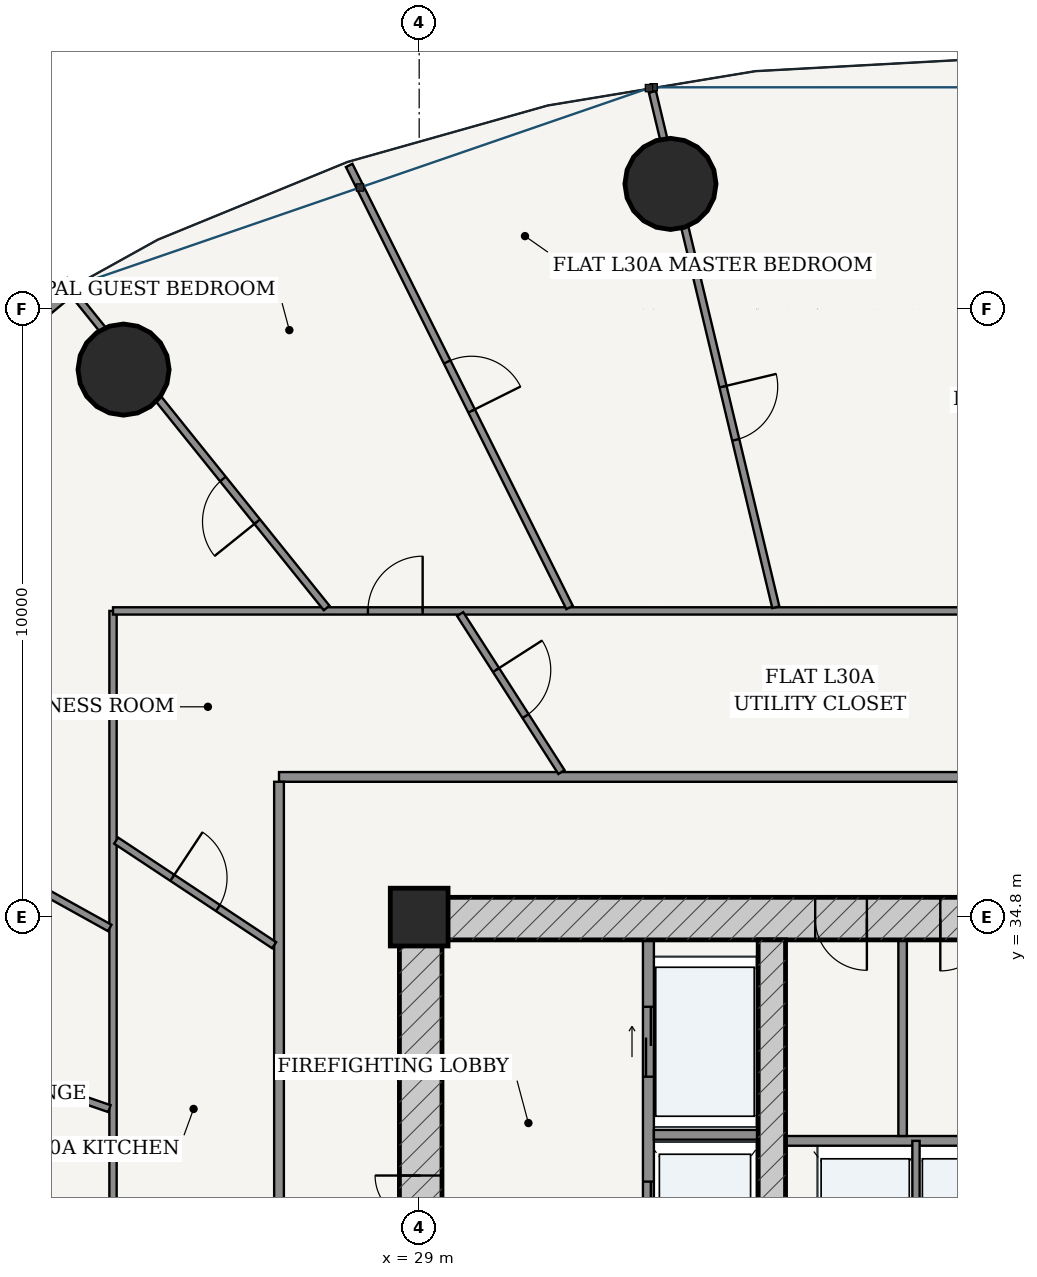
"""IFC4 building model, lengths in metres.
Left out: names, types, materials, properties, quantities, classifications, styles, units other than length and angle.
Written with IfcOpenShell. Run it as: python <this file> out.ifc"""

import sys

from ifc_helpers import new_model, si_unit, direction, frame, frame_2d, origin, origin_2d, place, context, subcontext, project, spatial, rectangle, hollow_circle, extrude, source, transform, mapped, element, fill, save


model = new_model("IFC4")
c1 = context("Model", 3, precision=1e-05, world=origin(), true_north=direction((-0.2419218956, 0.970295726276)))
c2 = subcontext(c1, "Body", "Model", "MODEL_VIEW")
j1 = project(units=[si_unit("LENGTHUNIT", "METRE"), si_unit("PLANEANGLEUNIT", "RADIAN")], contexts=[c1])
p1 = place(None, origin())
s1 = spatial("IfcSite", under=j1, at=p1, CompositionType="ELEMENT")
p2 = place(p1, origin())
s2 = spatial("IfcBuilding", under=s1, at=p2, CompositionType="ELEMENT")
p3 = place(p2, frame((0.0, 0.0, 115.8)))
s3 = spatial("IfcBuildingStorey", under=s2, at=p3, CompositionType="ELEMENT", Elevation=115.8)
p4 = place(p3, frame((29.0, 34.8, 0.0), z_axis=(0.0, 0.0, 1.0), x_axis=(1.0, 0.0, 0.0)))
e1 = element("IfcColumn", 1, at=p4, inside=s3, PredefinedType="COLUMN", context=c2, shape_type="SweptSolid", body=[
    extrude(rectangle(XDim=0.95, YDim=0.95, at=origin_2d()), origin(), (0.0, 0.0, 1.0), 3.6),
])
p5 = place(p3, frame((28.675, 34.775, 0.0), z_axis=(0.0, 0.0, 1.0), x_axis=(1.0, 0.0, 0.0)))
e2 = element("IfcWall", 2, at=p5, inside=s3, PredefinedType="SHEAR", context=c2, shape_type="SweptSolid", body=[
    extrude(rectangle(XDim=18.65, YDim=0.7, at=frame_2d((9.325, 0.0))), origin(), (0.0, 0.0, 1.0), 3.325),
])
p6 = place(p5, frame((6.837, 0.0, 0.0)))
e3 = element("IfcOpeningElement", 3, at=p6, cuts=e2, PredefinedType="OPENING", context=c2, shape_type="SweptSolid", body=[
    extrude(rectangle(XDim=0.85, YDim=2.1, at=frame_2d((0.425, 1.05))), frame((0.0, 0.36, 0.0), z_axis=(0.0, -1.0, 0.0), x_axis=(1.0, 0.0, 0.0)), (0.0, 0.0, 1.0), 0.72),
])
p7 = place(p5, frame((8.895, 0.0, 0.0)))
e4 = element("IfcOpeningElement", 4, at=p7, cuts=e2, PredefinedType="OPENING", context=c2, shape_type="SweptSolid", body=[
    extrude(rectangle(XDim=0.86, YDim=2.1, at=frame_2d((0.43, 1.05))), frame((0.0, 0.36, 0.0), z_axis=(0.0, -1.0, 0.0), x_axis=(1.0, 0.0, 0.0)), (0.0, 0.0, 1.0), 0.72),
])
p8 = place(p5, frame((10.962, 0.0, 0.0)))
e5 = element("IfcOpeningElement", 5, at=p8, cuts=e2, PredefinedType="OPENING", context=c2, shape_type="SweptSolid", body=[
    extrude(rectangle(XDim=0.85, YDim=2.1, at=frame_2d((0.425, 1.05))), frame((0.0, 0.36, 0.0), z_axis=(0.0, -1.0, 0.0), x_axis=(1.0, 0.0, 0.0)), (0.0, 0.0, 1.0), 0.72),
])
p9 = place(p3, frame((29.025, 19.175, 0.0), z_axis=(0.0, 0.0, 1.0), x_axis=(0.0, 1.0, 0.0)))
e6 = element("IfcWall", 6, at=p9, inside=s3, PredefinedType="SHEAR", context=c2, shape_type="SweptSolid", body=[
    extrude(rectangle(XDim=15.25, YDim=0.7, at=frame_2d((7.625, 0.0))), origin(), (0.0, 0.0, 1.0), 3.325),
])
p10 = place(p9, frame((9.875, 0.0, 0.0)))
e7 = element("IfcOpeningElement", 7, at=p10, cuts=e6, PredefinedType="OPENING", context=c2, shape_type="SweptSolid", body=[
    extrude(rectangle(XDim=1.5, YDim=2.2, at=frame_2d((0.75, 1.1))), frame((0.0, 0.36, 0.0), z_axis=(0.0, -1.0, 0.0), x_axis=(1.0, 0.0, 0.0)), (0.0, 0.0, 1.0), 0.72),
])
p11 = place(p3, frame((34.8, 19.175, 0.0), z_axis=(0.0, 0.0, 1.0), x_axis=(0.0, 1.0, 0.0)))
e8 = element("IfcWall", 8, at=p11, inside=s3, PredefinedType="SHEAR", context=c2, shape_type="SweptSolid", body=[
    extrude(rectangle(XDim=15.25, YDim=0.45, at=frame_2d((7.625, 0.0))), origin(), (0.0, 0.0, 1.0), 3.325),
])
p12 = place(p11, frame((7.8, 0.0, 0.0)))
e9 = element("IfcOpeningElement", 9, at=p12, cuts=e8, PredefinedType="OPENING", context=c2, shape_type="SweptSolid", body=[
    extrude(rectangle(XDim=1.05, YDim=2.15, at=frame_2d((0.525, 1.075))), frame((0.0, 0.235, 0.0), z_axis=(0.0, -1.0, 0.0), x_axis=(1.0, 0.0, 0.0)), (0.0, 0.0, 1.0), 0.47),
])
for number, where, z_axis, x_axis in (
    (10, (33.133, 46.857, 0.0), (0.0, 0.0, 1.0), (1.0, 0.0, 0.0)),
    (11, (24.138, 43.803, 0.0), (0.0, 0.0, 1.0), (1.0, 0.0, 0.0)),
):
    element("IfcColumn", number, at=place(p3, frame(where, z_axis=z_axis, x_axis=x_axis)), inside=s3, PredefinedType="COLUMN", context=c2, shape_type="SweptSolid", body=[
        extrude(hollow_circle(Radius=0.75, WallThickness=0.045, at=origin_2d()), origin(), (0.0, 0.0, 1.0), 3.6),
    ])
p13 = place(p3, frame((23.3, 45.202, 0.0), z_axis=(0.0, 0.0, 1.0), x_axis=(-0.769242574941, -0.638956853706, 0.0)))
e12 = element("IfcWall", 12, at=p13, inside=s3, PredefinedType="SOLIDWALL", context=c2, shape_type="SweptSolid", body=[
    extrude(rectangle(XDim=9.69, YDim=0.28, at=frame_2d((4.845, 0.0))), origin(), (0.0, 0.0, 1.0), 3.325),
])
p14 = place(p13, frame((1.566, 0.0, 0.85)))
e13 = element("IfcOpeningElement", 13, at=p14, cuts=e12, PredefinedType="OPENING", context=c2, shape_type="SweptSolid", body=[
    extrude(rectangle(XDim=2.1, YDim=1.95, at=frame_2d((1.05, 0.975))), frame((0.0, 0.15, 0.0), z_axis=(0.0, -1.0, 0.0), x_axis=(1.0, 0.0, 0.0)), (0.0, 0.0, 1.0), 0.3),
])
p15 = place(p13, frame((6.023, 0.0, 0.85)))
e14 = element("IfcOpeningElement", 14, at=p15, cuts=e12, PredefinedType="OPENING", context=c2, shape_type="SweptSolid", body=[
    extrude(rectangle(XDim=2.1, YDim=1.95, at=frame_2d((1.05, 0.975))), frame((0.0, 0.15, 0.0), z_axis=(0.0, -1.0, 0.0), x_axis=(1.0, 0.0, 0.0)), (0.0, 0.0, 1.0), 0.3),
])
p16 = place(p3, frame((32.77, 28.52, 0.0), z_axis=(0.0, 0.0, 1.0), x_axis=(0.0, 1.0, 0.0)))
e15 = element("IfcWall", 15, at=p16, inside=s3, PredefinedType="PARTITIONING", context=c2, shape_type="SweptSolid", body=[
    extrude(rectangle(XDim=5.905, YDim=0.18, at=frame_2d((2.953, 0.0))), origin(), (0.0, 0.0, 1.0), 3.325),
])
p17 = place(p16, frame((3.655, 0.0, 0.0)))
e16 = element("IfcOpeningElement", 16, at=p17, cuts=e15, PredefinedType="OPENING", context=c2, shape_type="SweptSolid", body=[
    extrude(rectangle(XDim=1.15, YDim=2.2, at=frame_2d((0.575, 1.1))), frame((0.0, 0.1, 0.0), z_axis=(0.0, -1.0, 0.0), x_axis=(1.0, 0.0, 0.0)), (0.0, 0.0, 1.0), 0.2),
])
p18 = place(p16, frame((0.73, 0.0, 0.0)))
e17 = element("IfcOpeningElement", 17, at=p18, cuts=e15, PredefinedType="OPENING", context=c2, shape_type="SweptSolid", body=[
    extrude(rectangle(XDim=1.2, YDim=2.25, at=frame_2d((0.6, 1.125))), frame((0.0, 0.1, 0.0), z_axis=(0.0, -1.0, 0.0), x_axis=(1.0, 0.0, 0.0)), (0.0, 0.0, 1.0), 0.2),
])
p19 = place(p3, frame((32.86, 31.22, 0.0), z_axis=(0.0, 0.0, 1.0), x_axis=(1.0, 0.0, 0.0)))
e18 = element("IfcWall", 18, at=p19, inside=s3, PredefinedType="PARTITIONING", context=c2, shape_type="SweptSolid", body=[
    extrude(rectangle(XDim=1.715, YDim=0.16, at=frame_2d((0.857, 0.0))), origin(), (0.0, 0.0, 1.0), 3.325),
])
p20 = place(p3, frame((35.025, 31.12, 0.0), z_axis=(0.0, 0.0, 1.0), x_axis=(1.0, 0.0, 0.0)))
e19 = element("IfcWall", 19, at=p20, inside=s3, PredefinedType="PARTITIONING", context=c2, shape_type="SweptSolid", body=[
    extrude(rectangle(XDim=5.95, YDim=0.16, at=frame_2d((2.975, 0.0))), origin(), (0.0, 0.0, 1.0), 3.325),
])
p21 = place(p3, frame((37.17, 28.56, 0.0), z_axis=(0.0, 0.0, 1.0), x_axis=(0.0, 1.0, 0.0)))
e20 = element("IfcWall", 20, at=p21, inside=s3, PredefinedType="PARTITIONING", context=c2, shape_type="SweptSolid", body=[
    extrude(rectangle(XDim=2.56, YDim=0.12, at=frame_2d((1.28, 0.0))), origin(), (0.0, 0.0, 1.0), 3.325),
])
p22 = place(p3, frame((36.95, 31.2, 0.0), z_axis=(0.0, 0.0, 1.0), x_axis=(0.0, 1.0, 0.0)))
e21 = element("IfcWall", 21, at=p22, inside=s3, PredefinedType="PARTITIONING", context=c2, shape_type="SweptSolid", body=[
    extrude(rectangle(XDim=3.225, YDim=0.14, at=frame_2d((1.613, 0.0))), origin(), (0.0, 0.0, 1.0), 3.325),
])
p23 = place(p3, frame((26.695, 37.105, 0.0), z_axis=(0.0, 0.0, 1.0), x_axis=(1.0, 0.0, 0.0)))
e22 = element("IfcWall", 22, at=p23, inside=s3, PredefinedType="PARTITIONING", context=c2, shape_type="SweptSolid", body=[
    extrude(rectangle(XDim=22.61, YDim=0.16, at=frame_2d((11.305, 0.0))), origin(), (0.0, 0.0, 1.0), 2.767),
])
p24 = place(p3, frame((26.695, 16.575, 0.0), z_axis=(0.0, 0.0, 1.0), x_axis=(0.0, 1.0, 0.0)))
e23 = element("IfcWall", 23, at=p24, inside=s3, PredefinedType="PARTITIONING", context=c2, shape_type="SweptSolid", body=[
    extrude(rectangle(XDim=20.45, YDim=0.16, at=frame_2d((10.225, 0.0))), origin(), (0.0, 0.0, 1.0), 2.767),
])
p25 = place(p24, frame((2.424, 0.0, 0.0)))
e24 = element("IfcOpeningElement", 24, at=p25, cuts=e23, PredefinedType="OPENING", context=c2, shape_type="SweptSolid", body=[
    extrude(rectangle(XDim=0.98, YDim=2.2, at=frame_2d((0.49, 1.1))), frame((0.0, 0.09, 0.0), z_axis=(0.0, -1.0, 0.0), x_axis=(1.0, 0.0, 0.0)), (0.0, 0.0, 1.0), 0.18),
])
p26 = place(p3, frame((23.965, 13.765, 0.0), z_axis=(0.0, 0.0, 1.0), x_axis=(0.0, 1.0, 0.0)))
e25 = element("IfcWall", 25, at=p26, inside=s3, PredefinedType="PARTITIONING", context=c2, shape_type="SweptSolid", body=[
    extrude(rectangle(XDim=26.07, YDim=0.12, at=frame_2d((13.035, 0.0))), origin(), (0.0, 0.0, 1.0), 2.767),
])
p27 = place(p26, frame((3.362, 0.0, 0.0)))
e26 = element("IfcOpeningElement", 26, at=p27, cuts=e25, PredefinedType="OPENING", context=c2, shape_type="SweptSolid", body=[
    extrude(rectangle(XDim=0.9, YDim=2.15, at=frame_2d((0.45, 1.075))), frame((0.0, 0.07, 0.0), z_axis=(0.0, -1.0, 0.0), x_axis=(1.0, 0.0, 0.0)), (0.0, 0.0, 1.0), 0.14),
])
p28 = place(p26, frame((13.924, 0.0, 0.0)))
e27 = element("IfcOpeningElement", 27, at=p28, cuts=e25, PredefinedType="OPENING", context=c2, shape_type="SweptSolid", body=[
    extrude(rectangle(XDim=0.9, YDim=2.15, at=frame_2d((0.45, 1.075))), frame((0.0, 0.07, 0.0), z_axis=(0.0, -1.0, 0.0), x_axis=(1.0, 0.0, 0.0)), (0.0, 0.0, 1.0), 0.14),
])
p29 = place(p3, frame((23.965, 39.835, 0.0), z_axis=(0.0, 0.0, 1.0), x_axis=(1.0, 0.0, 0.0)))
e28 = element("IfcWall", 28, at=p29, inside=s3, PredefinedType="PARTITIONING", context=c2, shape_type="SweptSolid", body=[
    extrude(rectangle(XDim=24.416, YDim=0.12, at=frame_2d((12.208, 0.0))), origin(), (0.0, 0.0, 1.0), 2.767),
])
p30 = place(p29, frame((4.192, 0.0, 0.0)))
e29 = element("IfcOpeningElement", 29, at=p30, cuts=e28, PredefinedType="OPENING", context=c2, shape_type="SweptSolid", body=[
    extrude(rectangle(XDim=0.9, YDim=2.15, at=frame_2d((0.45, 1.075))), frame((0.0, 0.07, 0.0), z_axis=(0.0, -1.0, 0.0), x_axis=(1.0, 0.0, 0.0)), (0.0, 0.0, 1.0), 0.14),
])
p31 = place(p29, frame((19.728, 0.0, 0.0)))
e30 = element("IfcOpeningElement", 30, at=p31, cuts=e28, PredefinedType="OPENING", context=c2, shape_type="SweptSolid", body=[
    extrude(rectangle(XDim=0.86, YDim=2.15, at=frame_2d((0.43, 1.075))), frame((0.0, 0.07, 0.0), z_axis=(0.0, -1.0, 0.0), x_axis=(1.0, 0.0, 0.0)), (0.0, 0.0, 1.0), 0.14),
])
p32 = place(p3, frame((34.865, 39.895, 0.0), z_axis=(0.0, 0.0, 1.0), x_axis=(-0.23282725047, 0.97251810854, 0.0)))
e31 = element("IfcWall", 31, at=p32, inside=s3, PredefinedType="PARTITIONING", context=c2, shape_type="SweptSolid", body=[
    extrude(rectangle(XDim=8.715, YDim=0.12, at=frame_2d((4.357, 0.0))), origin(), (0.0, 0.0, 1.0), 2.767),
])
p33 = place(p32, frame((2.831, 0.0, 0.0)))
e32 = element("IfcOpeningElement", 32, at=p33, cuts=e31, PredefinedType="OPENING", context=c2, shape_type="SweptSolid", body=[
    extrude(rectangle(XDim=0.9, YDim=2.15, at=frame_2d((0.45, 1.075))), frame((0.0, 0.07, 0.0), z_axis=(0.0, -1.0, 0.0), x_axis=(1.0, 0.0, 0.0)), (0.0, 0.0, 1.0), 0.14),
])
p34 = place(p3, frame((31.474, 39.89, 0.0), z_axis=(0.0, 0.0, 1.0), x_axis=(-0.446167584581, 0.894949432353, 0.0)))
e33 = element("IfcWall", 33, at=p34, inside=s3, PredefinedType="PARTITIONING", context=c2, shape_type="SweptSolid", body=[
    extrude(rectangle(XDim=8.125, YDim=0.12, at=frame_2d((4.062, 0.0))), origin(), (0.0, 0.0, 1.0), 2.767),
])
p35 = place(p34, frame((3.612, 0.0, 0.0)))
e34 = element("IfcOpeningElement", 34, at=p35, cuts=e33, PredefinedType="OPENING", context=c2, shape_type="SweptSolid", body=[
    extrude(rectangle(XDim=0.9, YDim=2.15, at=frame_2d((0.45, 1.075))), frame((0.0, 0.07, 0.0), z_axis=(0.0, -1.0, 0.0), x_axis=(1.0, 0.0, 0.0)), (0.0, 0.0, 1.0), 0.14),
])
p36 = place(p3, frame((27.478, 39.883, 0.0), z_axis=(0.0, 0.0, 1.0), x_axis=(-0.62672583251, 0.779239841682, 0.0)))
e35 = element("IfcWall", 35, at=p36, inside=s3, PredefinedType="PARTITIONING", context=c2, shape_type="SweptSolid", body=[
    extrude(rectangle(XDim=6.678, YDim=0.12, at=frame_2d((3.339, 0.0))), origin(), (0.0, 0.0, 1.0), 2.767),
])
p37 = place(p36, frame((1.821, 0.0, 0.0)))
e36 = element("IfcOpeningElement", 36, at=p37, cuts=e35, PredefinedType="OPENING", context=c2, shape_type="SweptSolid", body=[
    extrude(rectangle(XDim=0.9, YDim=2.15, at=frame_2d((0.45, 1.075))), frame((0.0, 0.07, 0.0), z_axis=(0.0, -1.0, 0.0), x_axis=(1.0, 0.0, 0.0)), (0.0, 0.0, 1.0), 0.14),
])
p38 = place(p3, frame((23.911, 34.622, 0.0), z_axis=(0.0, 0.0, 1.0), x_axis=(-0.874324904351, 0.485341077626, 0.0)))
e37 = element("IfcWall", 37, at=p38, inside=s3, PredefinedType="PARTITIONING", context=c2, shape_type="SweptSolid", body=[
    extrude(rectangle(XDim=9.066, YDim=0.12, at=frame_2d((4.533, 0.0))), origin(), (0.0, 0.0, 1.0), 2.767),
])
p39 = place(p3, frame((23.906, 31.65, 0.0), z_axis=(0.0, 0.0, 1.0), x_axis=(-0.945573120726, 0.32540970078, 0.0)))
e38 = element("IfcWall", 38, at=p39, inside=s3, PredefinedType="PARTITIONING", context=c2, shape_type="SweptSolid", body=[
    extrude(rectangle(XDim=11.022, YDim=0.12, at=frame_2d((5.511, 0.0))), origin(), (0.0, 0.0, 1.0), 2.767),
])
p40 = place(p39, frame((5.061, 0.0, 0.0)))
e39 = element("IfcOpeningElement", 39, at=p40, cuts=e38, PredefinedType="OPENING", context=c2, shape_type="SweptSolid", body=[
    extrude(rectangle(XDim=0.9, YDim=2.15, at=frame_2d((0.45, 1.075))), frame((0.0, 0.07, 0.0), z_axis=(0.0, -1.0, 0.0), x_axis=(1.0, 0.0, 0.0)), (0.0, 0.0, 1.0), 0.14),
])
p41 = place(p3, frame((23.904, 29.13, 0.0), z_axis=(0.0, 0.0, 1.0), x_axis=(-0.986618264768, 0.163047231274, 0.0)))
e40 = element("IfcWall", 40, at=p41, inside=s3, PredefinedType="PARTITIONING", context=c2, shape_type="SweptSolid", body=[
    extrude(rectangle(XDim=12.039, YDim=0.12, at=frame_2d((6.02, 0.0))), origin(), (0.0, 0.0, 1.0), 2.767),
])
p42 = place(p41, frame((4.496, 0.0, 0.0)))
e41 = element("IfcOpeningElement", 41, at=p42, cuts=e40, PredefinedType="OPENING", context=c2, shape_type="SweptSolid", body=[
    extrude(rectangle(XDim=0.9, YDim=2.15, at=frame_2d((0.45, 1.075))), frame((0.0, 0.07, 0.0), z_axis=(0.0, -1.0, 0.0), x_axis=(1.0, 0.0, 0.0)), (0.0, 0.0, 1.0), 0.14),
])
p43 = place(p3, frame((31.34, 37.185, 0.0), z_axis=(0.0, 0.0, 1.0), x_axis=(-0.539861631895, 0.841753775405, 0.0)))
e42 = element("IfcWall", 42, at=p43, inside=s3, PredefinedType="PARTITIONING", context=c2, shape_type="SweptSolid", body=[
    extrude(rectangle(XDim=3.086, YDim=0.12, at=frame_2d((1.543, 0.0))), origin(), (0.0, 0.0, 1.0), 3.325),
])
p44 = place(p43, frame((1.093, 0.0, 0.0)))
e43 = element("IfcOpeningElement", 43, at=p44, cuts=e42, PredefinedType="OPENING", context=c2, shape_type="SweptSolid", body=[
    extrude(rectangle(XDim=0.9, YDim=2.15, at=frame_2d((0.45, 1.075))), frame((0.0, 0.07, 0.0), z_axis=(0.0, -1.0, 0.0), x_axis=(1.0, 0.0, 0.0)), (0.0, 0.0, 1.0), 0.14),
])
p45 = place(p3, frame((26.615, 34.337, 0.0), z_axis=(0.0, 0.0, 1.0), x_axis=(-0.833829855758, 0.552021531868, 0.0)))
e44 = element("IfcWall", 44, at=p45, inside=s3, PredefinedType="PARTITIONING", context=c2, shape_type="SweptSolid", body=[
    extrude(rectangle(XDim=3.116, YDim=0.12, at=frame_2d((1.558, 0.0))), origin(), (0.0, 0.0, 1.0), 3.325),
])
p46 = place(p45, frame((1.108, 0.0, 0.0)))
e45 = element("IfcOpeningElement", 45, at=p46, cuts=e44, PredefinedType="OPENING", context=c2, shape_type="SweptSolid", body=[
    extrude(rectangle(XDim=0.9, YDim=2.15, at=frame_2d((0.45, 1.075))), frame((0.0, 0.07, 0.0), z_axis=(0.0, -1.0, 0.0), x_axis=(1.0, 0.0, 0.0)), (0.0, 0.0, 1.0), 0.14),
])
m1 = source(origin(), c2, "Body", "SweptSolid", [
    extrude(rectangle(XDim=1.5, YDim=2.2, at=frame_2d((0.75, 1.1))), frame((0.0, 0.025, 0.0), z_axis=(0.0, -1.0, 0.0), x_axis=(1.0, 0.0, 0.0)), (0.0, 0.0, 1.0), 0.05),
])
p47 = place(p10, origin())
e46 = element("IfcDoor", 46, at=p47, inside=s3, OperationType="DOUBLE_DOOR_SINGLE_SWING", PredefinedType="DOOR", context=c2, shape_type="MappedRepresentation", body=[
    mapped(m1, transform((0.0, 0.0, 0.0), scale=1.0)),
])
fill(e7, e46)
m2 = source(origin(), c2, "Body", "SweptSolid", [
    extrude(rectangle(XDim=0.85, YDim=2.1, at=frame_2d((0.425, 1.05))), frame((0.0, 0.025, 0.0), z_axis=(0.0, -1.0, 0.0), x_axis=(1.0, 0.0, 0.0)), (0.0, 0.0, 1.0), 0.05),
])
p48 = place(p6, frame((0.85, 0.0, 0.0), z_axis=(0.0, 0.0, 1.0), x_axis=(-1.0, 0.0, 0.0)))
e47 = element("IfcDoor", 47, at=p48, inside=s3, OperationType="SINGLE_SWING_LEFT", PredefinedType="DOOR", context=c2, shape_type="MappedRepresentation", body=[
    mapped(m2, transform((0.0, 0.0, 0.0), scale=1.0)),
])
fill(e3, e47)
m3 = source(origin(), c2, "Body", "SweptSolid", [
    extrude(rectangle(XDim=0.86, YDim=2.1, at=frame_2d((0.43, 1.05))), frame((0.0, 0.025, 0.0), z_axis=(0.0, -1.0, 0.0), x_axis=(1.0, 0.0, 0.0)), (0.0, 0.0, 1.0), 0.05),
])
p49 = place(p7, frame((0.86, 0.0, 0.0), z_axis=(0.0, 0.0, 1.0), x_axis=(-1.0, 0.0, 0.0)))
e48 = element("IfcDoor", 48, at=p49, inside=s3, OperationType="SINGLE_SWING_RIGHT", PredefinedType="DOOR", context=c2, shape_type="MappedRepresentation", body=[
    mapped(m3, transform((0.0, 0.0, 0.0), scale=1.0)),
])
fill(e4, e48)
m4 = source(origin(), c2, "Body", "SweptSolid", [
    extrude(rectangle(XDim=1.15, YDim=2.2, at=frame_2d((0.575, 1.1))), frame((0.0, 0.025, 0.0), z_axis=(0.0, -1.0, 0.0), x_axis=(1.0, 0.0, 0.0)), (0.0, 0.0, 1.0), 0.05),
])
p50 = place(p17, origin())
e49 = element("IfcDoor", 49, at=p50, inside=s3, OperationType="DOUBLE_DOOR_SLIDING", PredefinedType="DOOR", context=c2, shape_type="MappedRepresentation", body=[
    mapped(m4, transform((0.0, 0.0, 0.0), scale=1.0)),
])
fill(e16, e49)
m5 = source(origin(), c2, "Body", "SweptSolid", [
    extrude(rectangle(XDim=1.2, YDim=2.25, at=frame_2d((0.6, 1.125))), frame((0.0, 0.025, 0.0), z_axis=(0.0, -1.0, 0.0), x_axis=(1.0, 0.0, 0.0)), (0.0, 0.0, 1.0), 0.05),
])
p51 = place(p18, origin())
e50 = element("IfcDoor", 50, at=p51, inside=s3, OperationType="DOUBLE_DOOR_SLIDING", PredefinedType="DOOR", context=c2, shape_type="MappedRepresentation", body=[
    mapped(m5, transform((0.0, 0.0, 0.0), scale=1.0)),
])
fill(e17, e50)
m6 = source(origin(), c2, "Body", "SweptSolid", [
    extrude(rectangle(XDim=0.9, YDim=2.15, at=frame_2d((0.45, 1.075))), frame((0.0, 0.025, 0.0), z_axis=(0.0, -1.0, 0.0), x_axis=(1.0, 0.0, 0.0)), (0.0, 0.0, 1.0), 0.05),
])
p52 = place(p46, frame((0.9, 0.0, 0.0), z_axis=(0.0, 0.0, 1.0), x_axis=(-1.0, 0.0, 0.0)))
e51 = element("IfcDoor", 51, at=p52, inside=s3, OperationType="SINGLE_SWING_LEFT", PredefinedType="DOOR", context=c2, shape_type="MappedRepresentation", body=[
    mapped(m6, transform((0.0, 0.0, 0.0), scale=1.0)),
])
fill(e45, e51)
p53 = place(p30, origin())
e52 = element("IfcDoor", 52, at=p53, inside=s3, OperationType="SINGLE_SWING_RIGHT", PredefinedType="DOOR", context=c2, shape_type="MappedRepresentation", body=[
    mapped(m6, transform((0.0, 0.0, 0.0), scale=1.0)),
])
fill(e29, e52)
p54 = place(p37, origin())
e53 = element("IfcDoor", 53, at=p54, inside=s3, OperationType="SINGLE_SWING_LEFT", PredefinedType="DOOR", context=c2, shape_type="MappedRepresentation", body=[
    mapped(m6, transform((0.0, 0.0, 0.0), scale=1.0)),
])
fill(e36, e53)
p55 = place(p44, frame((0.9, 0.0, 0.0), z_axis=(0.0, 0.0, 1.0), x_axis=(-1.0, 0.0, 0.0)))
e54 = element("IfcDoor", 54, at=p55, inside=s3, OperationType="SINGLE_SWING_LEFT", PredefinedType="DOOR", context=c2, shape_type="MappedRepresentation", body=[
    mapped(m6, transform((0.0, 0.0, 0.0), scale=1.0)),
])
fill(e43, e54)
p56 = place(p35, frame((0.9, 0.0, 0.0), z_axis=(0.0, 0.0, 1.0), x_axis=(-1.0, 0.0, 0.0)))
e55 = element("IfcDoor", 55, at=p56, inside=s3, OperationType="SINGLE_SWING_RIGHT", PredefinedType="DOOR", context=c2, shape_type="MappedRepresentation", body=[
    mapped(m6, transform((0.0, 0.0, 0.0), scale=1.0)),
])
fill(e34, e55)
p57 = place(p33, frame((0.9, 0.0, 0.0), z_axis=(0.0, 0.0, 1.0), x_axis=(-1.0, 0.0, 0.0)))
e56 = element("IfcDoor", 56, at=p57, inside=s3, OperationType="SINGLE_SWING_LEFT", PredefinedType="DOOR", context=c2, shape_type="MappedRepresentation", body=[
    mapped(m6, transform((0.0, 0.0, 0.0), scale=1.0)),
])
fill(e32, e56)
save(model, sys.argv[1])
